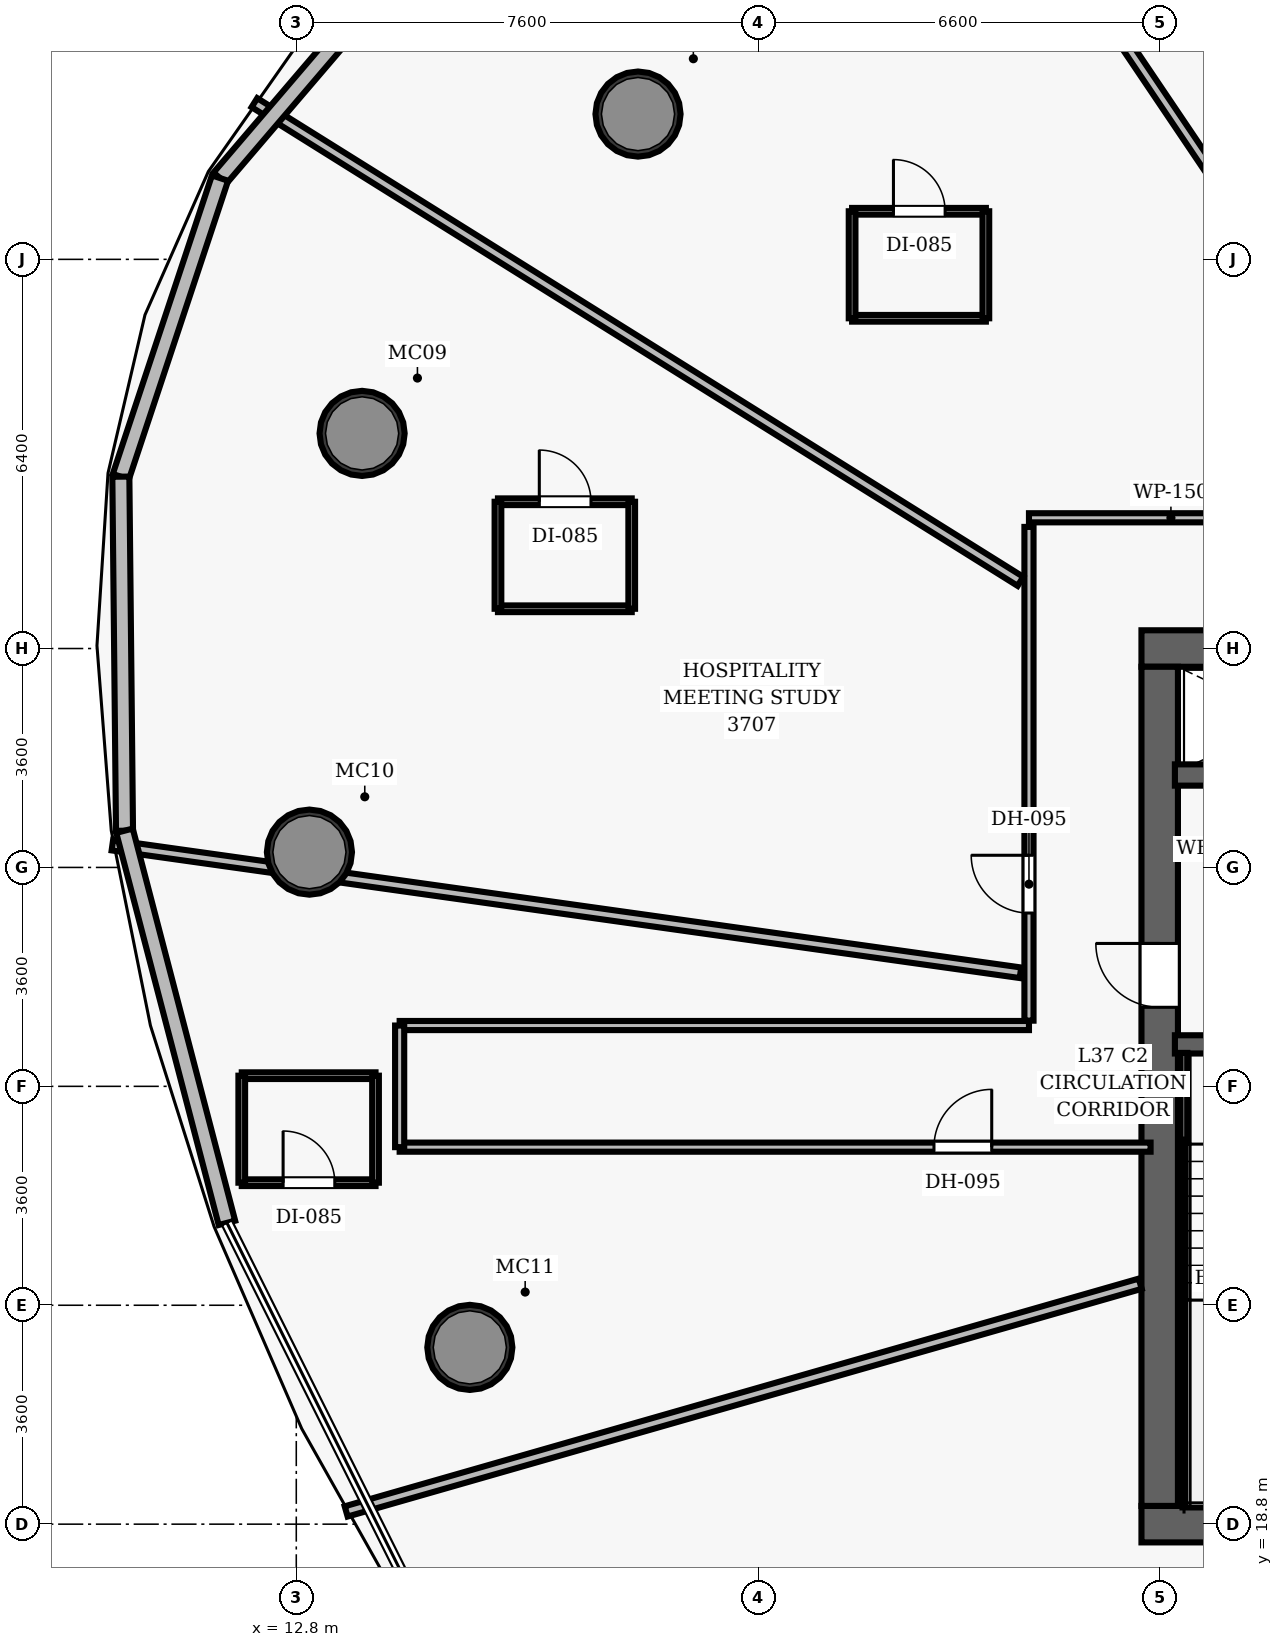
"""IFC4 building model, lengths in metres.
Left out: names, types, materials, properties, quantities, classifications, styles, units other than length and angle.
Written with IfcOpenShell. Run it as: python <this file> out.ifc"""

import sys

from ifc_helpers import new_model, si_unit, direction, frame, frame_2d, origin, origin_2d, place, context, subcontext, project, spatial, rectangle, hollow_circle, extrude, element, fill, save


model = new_model("IFC4")
c1 = context("Model", 3, precision=1e-05, world=origin(), true_north=direction((0.0, 1.0)))
c2 = subcontext(c1, "Body", "Model", "MODEL_VIEW")
j1 = project(units=[si_unit("LENGTHUNIT", "METRE"), si_unit("PLANEANGLEUNIT", "RADIAN")], contexts=[c1])
p1 = place(None, origin())
s1 = spatial("IfcSite", under=j1, at=p1, CompositionType="ELEMENT")
p2 = place(p1, origin())
s2 = spatial("IfcBuilding", under=s1, at=p2, CompositionType="ELEMENT")
p3 = place(p2, frame((0.0, 0.0, 148.3)))
s3 = spatial("IfcBuildingStorey", under=s2, at=p3, CompositionType="ELEMENT", Elevation=148.3)
p4 = place(p3, frame((26.7, 18.8, 0.0), z_axis=(0.0, 0.0, 1.0), x_axis=(1.0, 0.0, 0.0)))
e1 = element("IfcWall", 1, at=p4, inside=s3, PredefinedType="SHEAR", context=c2, shape_type="SweptSolid", body=[
    extrude(rectangle(XDim=22.6, YDim=0.6, at=frame_2d((11.3, 0.0))), origin(), (0.0, 0.0, 1.0), 3.5),
])
p5 = place(p4, frame((14.52, 0.0, 0.0)))
e2 = element("IfcOpeningElement", 2, at=p5, cuts=e1, PredefinedType="OPENING", context=c2, shape_type="SweptSolid", body=[
    extrude(rectangle(XDim=1.05, YDim=2.15, at=frame_2d((0.525, 1.075))), frame((0.0, 0.31, 0.0), z_axis=(0.0, -1.0, 0.0), x_axis=(1.0, 0.0, 0.0)), (0.0, 0.0, 1.0), 0.62),
])
p6 = place(p3, frame((26.7, 33.2, 0.0), z_axis=(0.0, 0.0, 1.0), x_axis=(1.0, 0.0, 0.0)))
e3 = element("IfcWall", 3, at=p6, inside=s3, PredefinedType="SHEAR", context=c2, shape_type="SweptSolid", body=[
    extrude(rectangle(XDim=22.6, YDim=0.6, at=frame_2d((11.3, 0.0))), origin(), (0.0, 0.0, 1.0), 3.5),
])
p7 = place(p6, frame((4.62, 0.0, 0.0)))
e4 = element("IfcOpeningElement", 4, at=p7, cuts=e3, PredefinedType="OPENING", context=c2, shape_type="SweptSolid", body=[
    extrude(rectangle(XDim=1.05, YDim=2.15, at=frame_2d((0.525, 1.075))), frame((0.0, 0.31, 0.0), z_axis=(0.0, -1.0, 0.0), x_axis=(1.0, 0.0, 0.0)), (0.0, 0.0, 1.0), 0.62),
])
p8 = place(p6, frame((14.52, 0.0, 0.0)))
e5 = element("IfcOpeningElement", 5, at=p8, cuts=e3, PredefinedType="OPENING", context=c2, shape_type="SweptSolid", body=[
    extrude(rectangle(XDim=1.05, YDim=2.15, at=frame_2d((0.525, 1.075))), frame((0.0, 0.31, 0.0), z_axis=(0.0, -1.0, 0.0), x_axis=(1.0, 0.0, 0.0)), (0.0, 0.0, 1.0), 0.62),
])
p9 = place(p3, frame((27.0, 19.1, 0.0), z_axis=(0.0, 0.0, 1.0), x_axis=(0.0, 1.0, 0.0)))
e6 = element("IfcWall", 6, at=p9, inside=s3, PredefinedType="SHEAR", context=c2, shape_type="SweptSolid", body=[
    extrude(rectangle(XDim=13.8, YDim=0.6, at=frame_2d((6.9, 0.0))), origin(), (0.0, 0.0, 1.0), 3.5),
])
p10 = place(p9, frame((8.2, 0.0, 0.0)))
e7 = element("IfcOpeningElement", 7, at=p10, cuts=e6, PredefinedType="OPENING", context=c2, shape_type="SweptSolid", body=[
    extrude(rectangle(XDim=1.05, YDim=2.15, at=frame_2d((0.525, 1.075))), frame((0.0, 0.31, 0.0), z_axis=(0.0, -1.0, 0.0), x_axis=(1.0, 0.0, 0.0)), (0.0, 0.0, 1.0), 0.62),
])
for number, where, z_axis, x_axis in (
    (8, (18.42, 41.989, 0.0), (0.0, 0.0, 1.0), (1.0, 0.0, 0.0)),
    (9, (13.882, 36.738, 0.0), (0.0, 0.0, 1.0), (1.0, 0.0, 0.0)),
    (10, (13.016, 29.852, 0.0), (0.0, 0.0, 1.0), (1.0, 0.0, 0.0)),
    (11, (15.654, 21.707, 0.0), (0.0, 0.0, 1.0), (1.0, 0.0, 0.0)),
):
    element("IfcColumn", number, at=place(p3, frame(where, z_axis=z_axis, x_axis=x_axis)), inside=s3, PredefinedType="COLUMN", context=c2, shape_type="SweptSolid", body=[
        extrude(hollow_circle(Radius=0.7, WallThickness=0.055, at=origin_2d()), origin(), (0.0, 0.0, 1.0), 3.5),
    ])
p11 = place(p3, frame((27.25, 26.69, 0.0), z_axis=(0.0, 0.0, 1.0), x_axis=(1.0, 0.0, 0.0)))
e12 = element("IfcWall", 12, at=p11, inside=s3, PredefinedType="SHEAR", context=c2, shape_type="SweptSolid", body=[
    extrude(rectangle(XDim=3.67, YDim=0.3, at=frame_2d((1.835, 0.0))), origin(), (0.0, 0.0, 1.0), 3.5),
])
p12 = place(p11, frame((1.05, 0.0, 0.0)))
e13 = element("IfcOpeningElement", 13, at=p12, cuts=e12, PredefinedType="OPENING", context=c2, shape_type="SweptSolid", body=[
    extrude(rectangle(XDim=1.1, YDim=2.15, at=frame_2d((0.55, 1.075))), frame((0.0, 0.16, 0.0), z_axis=(0.0, -1.0, 0.0), x_axis=(1.0, 0.0, 0.0)), (0.0, 0.0, 1.0), 0.32),
])
p13 = place(p3, frame((27.395, 19.1, 0.0), z_axis=(0.0, 0.0, 1.0), x_axis=(0.0, 1.0, 0.0)))
e14 = element("IfcWall", 14, at=p13, inside=s3, PredefinedType="SHEAR", context=c2, shape_type="SweptSolid", body=[
    extrude(rectangle(XDim=7.45, YDim=0.12, at=frame_2d((3.725, 0.0))), origin(), (0.0, 0.0, 1.0), 3.5),
])
p14 = place(p3, frame((27.395, 19.16, 0.0), z_axis=(0.0, 0.0, 1.0), x_axis=(1.0, 0.0, 0.0)))
e15 = element("IfcWall", 15, at=p14, inside=s3, PredefinedType="SHEAR", context=c2, shape_type="SweptSolid", body=[
    extrude(rectangle(XDim=3.095, YDim=0.12, at=frame_2d((1.547, 0.0))), origin(), (0.0, 0.0, 1.0), 3.5),
])
p15 = place(p3, frame((27.25, 31.12, 0.0), z_axis=(0.0, 0.0, 1.0), x_axis=(1.0, 0.0, 0.0)))
e16 = element("IfcWall", 16, at=p15, inside=s3, PredefinedType="SHEAR", context=c2, shape_type="SweptSolid", body=[
    extrude(rectangle(XDim=3.67, YDim=0.35, at=frame_2d((1.835, 0.0))), origin(), (0.0, 0.0, 1.0), 2.675),
])
p16 = place(p15, frame((1.25, 0.0, 0.0)))
e17 = element("IfcOpeningElement", 17, at=p16, cuts=e16, PredefinedType="OPENING", context=c2, shape_type="SweptSolid", body=[
    extrude(rectangle(XDim=1.1, YDim=2.15, at=frame_2d((0.55, 1.075))), frame((0.0, 0.185, 0.0), z_axis=(0.0, -1.0, 0.0), x_axis=(1.0, 0.0, 0.0)), (0.0, 0.0, 1.0), 0.37),
])
p17 = place(p3, frame((24.85, 35.35, 0.0), z_axis=(0.0, 0.0, 1.0), x_axis=(1.0, 0.0, 0.0)))
e18 = element("IfcWall", 18, at=p17, inside=s3, PredefinedType="PARTITIONING", context=c2, shape_type="SweptSolid", body=[
    extrude(rectangle(XDim=26.0, YDim=0.15, at=frame_2d((13.0, 0.0))), origin(), (0.0, 0.0, 1.0), 2.675),
])
p18 = place(p17, frame((21.789, 0.0, 0.0)))
e19 = element("IfcOpeningElement", 19, at=p18, cuts=e18, PredefinedType="OPENING", context=c2, shape_type="SweptSolid", body=[
    extrude(rectangle(XDim=0.95, YDim=2.15, at=frame_2d((0.475, 1.075))), frame((0.0, 0.085, 0.0), z_axis=(0.0, -1.0, 0.0), x_axis=(1.0, 0.0, 0.0)), (0.0, 0.0, 1.0), 0.17),
])
p19 = place(p17, frame((16.151, 0.0, 0.0)))
e20 = element("IfcOpeningElement", 20, at=p19, cuts=e18, PredefinedType="OPENING", context=c2, shape_type="SweptSolid", body=[
    extrude(rectangle(XDim=0.95, YDim=2.15, at=frame_2d((0.475, 1.075))), frame((0.0, 0.085, 0.0), z_axis=(0.0, -1.0, 0.0), x_axis=(1.0, 0.0, 0.0)), (0.0, 0.0, 1.0), 0.17),
])
p20 = place(p17, frame((12.327, 0.0, 0.0)))
e21 = element("IfcOpeningElement", 21, at=p20, cuts=e18, PredefinedType="OPENING", context=c2, shape_type="SweptSolid", body=[
    extrude(rectangle(XDim=0.95, YDim=2.15, at=frame_2d((0.475, 1.075))), frame((0.0, 0.085, 0.0), z_axis=(0.0, -1.0, 0.0), x_axis=(1.0, 0.0, 0.0)), (0.0, 0.0, 1.0), 0.17),
])
p21 = place(p17, frame((7.312, 0.0, 0.0)))
e22 = element("IfcOpeningElement", 22, at=p21, cuts=e18, PredefinedType="OPENING", context=c2, shape_type="SweptSolid", body=[
    extrude(rectangle(XDim=0.95, YDim=2.15, at=frame_2d((0.475, 1.075))), frame((0.0, 0.085, 0.0), z_axis=(0.0, -1.0, 0.0), x_axis=(1.0, 0.0, 0.0)), (0.0, 0.0, 1.0), 0.17),
])
p22 = place(p17, frame((4.819, 0.0, 0.0)))
e23 = element("IfcOpeningElement", 23, at=p22, cuts=e18, PredefinedType="OPENING", context=c2, shape_type="SweptSolid", body=[
    extrude(rectangle(XDim=0.95, YDim=2.15, at=frame_2d((0.475, 1.075))), frame((0.0, 0.085, 0.0), z_axis=(0.0, -1.0, 0.0), x_axis=(1.0, 0.0, 0.0)), (0.0, 0.0, 1.0), 0.17),
])
p23 = place(p3, frame((24.85, 27.08, 0.0), z_axis=(0.0, 0.0, 1.0), x_axis=(0.0, 1.0, 0.0)))
e24 = element("IfcWall", 24, at=p23, inside=s3, PredefinedType="PARTITIONING", context=c2, shape_type="SweptSolid", body=[
    extrude(rectangle(XDim=8.12, YDim=0.15, at=frame_2d((4.06, 0.0))), origin(), (0.0, 0.0, 1.0), 2.675),
])
p24 = place(p23, frame((1.77, 0.0, 0.0)))
e25 = element("IfcOpeningElement", 25, at=p24, cuts=e24, PredefinedType="OPENING", context=c2, shape_type="SweptSolid", body=[
    extrude(rectangle(XDim=0.95, YDim=2.15, at=frame_2d((0.475, 1.075))), frame((0.0, 0.085, 0.0), z_axis=(0.0, -1.0, 0.0), x_axis=(1.0, 0.0, 0.0)), (0.0, 0.0, 1.0), 0.17),
])
p25 = place(p3, frame((14.5, 27.0, 0.0), z_axis=(0.0, 0.0, 1.0), x_axis=(1.0, 0.0, 0.0)))
e26 = element("IfcWall", 26, at=p25, inside=s3, PredefinedType="PARTITIONING", context=c2, shape_type="SweptSolid", body=[
    extrude(rectangle(XDim=10.35, YDim=0.15, at=frame_2d((5.175, 0.0))), origin(), (0.0, 0.0, 1.0), 2.675),
])
p26 = place(p3, frame((14.5, 25.0, 0.0), z_axis=(0.0, 0.0, 1.0), x_axis=(1.0, 0.0, 0.0)))
e27 = element("IfcWall", 27, at=p26, inside=s3, PredefinedType="PARTITIONING", context=c2, shape_type="SweptSolid", body=[
    extrude(rectangle(XDim=12.35, YDim=0.15, at=frame_2d((6.175, 0.0))), origin(), (0.0, 0.0, 1.0), 2.675),
])
p27 = place(p26, frame((8.788, 0.0, 0.0)))
e28 = element("IfcOpeningElement", 28, at=p27, cuts=e27, PredefinedType="OPENING", context=c2, shape_type="SweptSolid", body=[
    extrude(rectangle(XDim=0.95, YDim=2.15, at=frame_2d((0.475, 1.075))), frame((0.0, 0.085, 0.0), z_axis=(0.0, -1.0, 0.0), x_axis=(1.0, 0.0, 0.0)), (0.0, 0.0, 1.0), 0.17),
])
p28 = place(p3, frame((14.5, 25.0, 0.0), z_axis=(0.0, 0.0, 1.0), x_axis=(0.0, 1.0, 0.0)))
e29 = element("IfcWall", 29, at=p28, inside=s3, PredefinedType="PARTITIONING", context=c2, shape_type="SweptSolid", body=[
    extrude(rectangle(XDim=2.0, YDim=0.15, at=frame_2d((1.0, 0.0))), origin(), (0.0, 0.0, 1.0), 2.675),
])
p29 = place(p3, frame((31.599, 35.49, 0.0), z_axis=(0.0, 0.0, 1.0), x_axis=(-0.55918931687, 0.829039991736, 0.0)))
e30 = element("IfcWall", 30, at=p29, inside=s3, PredefinedType="PARTITIONING", context=c2, shape_type="SweptSolid", body=[
    extrude(rectangle(XDim=16.299, YDim=0.175, at=frame_2d((8.149, 0.0))), origin(), (0.0, 0.0, 1.0), 2.675),
])
p30 = place(p3, frame((24.71, 34.304, 0.0), z_axis=(0.0, 0.0, 1.0), x_axis=(-0.848041694206, 0.529929509357, 0.0)))
e31 = element("IfcWall", 31, at=p30, inside=s3, PredefinedType="PARTITIONING", context=c2, shape_type="SweptSolid", body=[
    extrude(rectangle(XDim=14.856, YDim=0.175, at=frame_2d((7.428, 0.0))), origin(), (0.0, 0.0, 1.0), 2.675),
])
p31 = place(p3, frame((24.71, 27.868, 0.0), z_axis=(0.0, 0.0, 1.0), x_axis=(-0.990268434497, 0.139170498453, 0.0)))
e32 = element("IfcWall", 32, at=p31, inside=s3, PredefinedType="PARTITIONING", context=c2, shape_type="SweptSolid", body=[
    extrude(rectangle(XDim=15.081, YDim=0.175, at=frame_2d((7.541, 0.0))), origin(), (0.0, 0.0, 1.0), 2.675),
])
p32 = place(p3, frame((26.68, 22.754, 0.0), z_axis=(0.0, 0.0, 1.0), x_axis=(-0.96126584255, -0.275622894454, 0.0)))
e33 = element("IfcWall", 33, at=p32, inside=s3, PredefinedType="PARTITIONING", context=c2, shape_type="SweptSolid", body=[
    extrude(rectangle(XDim=13.586, YDim=0.175, at=frame_2d((6.793, 0.0))), origin(), (0.0, 0.0, 1.0), 2.675),
])
p33 = place(p3, frame((29.038, 18.48, 0.0), z_axis=(0.0, 0.0, 1.0), x_axis=(-0.766047971117, -0.642783405159, 0.0)))
e34 = element("IfcWall", 34, at=p33, inside=s3, PredefinedType="PARTITIONING", context=c2, shape_type="SweptSolid", body=[
    extrude(rectangle(XDim=11.939, YDim=0.175, at=frame_2d((5.97, 0.0))), origin(), (0.0, 0.0, 1.0), 2.675),
])
p34 = place(p3, frame((21.941, 38.631, 0.0), z_axis=(0.0, 0.0, 1.0), x_axis=(1.0, 0.0, 0.0)))
e35 = element("IfcWall", 35, at=p34, inside=s3, PredefinedType="PARTITIONING", context=c2, shape_type="SweptSolid", body=[
    extrude(rectangle(XDim=2.2, YDim=0.11, at=frame_2d((1.1, 0.0))), origin(), (0.0, 0.0, 1.0), 2.675),
])
p35 = place(p3, frame((21.941, 40.391, 0.0), z_axis=(0.0, 0.0, 1.0), x_axis=(1.0, 0.0, 0.0)))
e36 = element("IfcWall", 36, at=p35, inside=s3, PredefinedType="PARTITIONING", context=c2, shape_type="SweptSolid", body=[
    extrude(rectangle(XDim=2.2, YDim=0.11, at=frame_2d((1.1, 0.0))), origin(), (0.0, 0.0, 1.0), 2.675),
])
p36 = place(p35, frame((0.68, 0.0, 0.0)))
e37 = element("IfcOpeningElement", 37, at=p36, cuts=e36, PredefinedType="OPENING", context=c2, shape_type="SweptSolid", body=[
    extrude(rectangle(XDim=0.85, YDim=2.1, at=frame_2d((0.425, 1.05))), frame((0.0, 0.065, 0.0), z_axis=(0.0, -1.0, 0.0), x_axis=(1.0, 0.0, 0.0)), (0.0, 0.0, 1.0), 0.13),
])
for number, where, z_axis, x_axis in (
    (38, (21.941, 38.631, 0.0), (0.0, 0.0, 1.0), (0.0, 1.0, 0.0)),
    (39, (24.141, 38.631, 0.0), (0.0, 0.0, 1.0), (0.0, 1.0, 0.0)),
):
    element("IfcWall", number, at=place(p3, frame(where, z_axis=z_axis, x_axis=x_axis)), inside=s3, PredefinedType="PARTITIONING", context=c2, shape_type="SweptSolid", body=[
        extrude(rectangle(XDim=1.76, YDim=0.11, at=frame_2d((0.88, 0.0))), origin(), (0.0, 0.0, 1.0), 2.675),
    ])
p37 = place(p3, frame((16.117, 33.854, 0.0), z_axis=(0.0, 0.0, 1.0), x_axis=(1.0, 0.0, 0.0)))
e40 = element("IfcWall", 40, at=p37, inside=s3, PredefinedType="PARTITIONING", context=c2, shape_type="SweptSolid", body=[
    extrude(rectangle(XDim=2.2, YDim=0.11, at=frame_2d((1.1, 0.0))), origin(), (0.0, 0.0, 1.0), 2.675),
])
p38 = place(p3, frame((16.117, 35.614, 0.0), z_axis=(0.0, 0.0, 1.0), x_axis=(1.0, 0.0, 0.0)))
e41 = element("IfcWall", 41, at=p38, inside=s3, PredefinedType="PARTITIONING", context=c2, shape_type="SweptSolid", body=[
    extrude(rectangle(XDim=2.2, YDim=0.11, at=frame_2d((1.1, 0.0))), origin(), (0.0, 0.0, 1.0), 2.675),
])
p39 = place(p38, frame((0.68, 0.0, 0.0)))
e42 = element("IfcOpeningElement", 42, at=p39, cuts=e41, PredefinedType="OPENING", context=c2, shape_type="SweptSolid", body=[
    extrude(rectangle(XDim=0.85, YDim=2.1, at=frame_2d((0.425, 1.05))), frame((0.0, 0.065, 0.0), z_axis=(0.0, -1.0, 0.0), x_axis=(1.0, 0.0, 0.0)), (0.0, 0.0, 1.0), 0.13),
])
for number, where, z_axis, x_axis in (
    (43, (16.117, 33.854, 0.0), (0.0, 0.0, 1.0), (0.0, 1.0, 0.0)),
    (44, (18.317, 33.854, 0.0), (0.0, 0.0, 1.0), (0.0, 1.0, 0.0)),
):
    element("IfcWall", number, at=place(p3, frame(where, z_axis=z_axis, x_axis=x_axis)), inside=s3, PredefinedType="PARTITIONING", context=c2, shape_type="SweptSolid", body=[
        extrude(rectangle(XDim=1.76, YDim=0.11, at=frame_2d((0.88, 0.0))), origin(), (0.0, 0.0, 1.0), 2.675),
    ])
p40 = place(p3, frame((11.903, 24.415, 0.0), z_axis=(0.0, 0.0, 1.0), x_axis=(1.0, 0.0, 0.0)))
e45 = element("IfcWall", 45, at=p40, inside=s3, PredefinedType="PARTITIONING", context=c2, shape_type="SweptSolid", body=[
    extrude(rectangle(XDim=2.2, YDim=0.11, at=frame_2d((1.1, 0.0))), origin(), (0.0, 0.0, 1.0), 2.675),
])
p41 = place(p40, frame((0.68, 0.0, 0.0)))
e46 = element("IfcOpeningElement", 46, at=p41, cuts=e45, PredefinedType="OPENING", context=c2, shape_type="SweptSolid", body=[
    extrude(rectangle(XDim=0.85, YDim=2.1, at=frame_2d((0.425, 1.05))), frame((0.0, 0.065, 0.0), z_axis=(0.0, -1.0, 0.0), x_axis=(1.0, 0.0, 0.0)), (0.0, 0.0, 1.0), 0.13),
])
p42 = place(p3, frame((11.903, 26.175, 0.0), z_axis=(0.0, 0.0, 1.0), x_axis=(1.0, 0.0, 0.0)))
e47 = element("IfcWall", 47, at=p42, inside=s3, PredefinedType="PARTITIONING", context=c2, shape_type="SweptSolid", body=[
    extrude(rectangle(XDim=2.2, YDim=0.11, at=frame_2d((1.1, 0.0))), origin(), (0.0, 0.0, 1.0), 2.675),
])
for number, where, z_axis, x_axis in (
    (48, (11.903, 24.415, 0.0), (0.0, 0.0, 1.0), (0.0, 1.0, 0.0)),
    (49, (14.103, 24.415, 0.0), (0.0, 0.0, 1.0), (0.0, 1.0, 0.0)),
):
    element("IfcWall", number, at=place(p3, frame(where, z_axis=z_axis, x_axis=x_axis)), inside=s3, PredefinedType="PARTITIONING", context=c2, shape_type="SweptSolid", body=[
        extrude(rectangle(XDim=1.76, YDim=0.11, at=frame_2d((0.88, 0.0))), origin(), (0.0, 0.0, 1.0), 2.675),
    ])
for number, where, z_axis, x_axis in (
    (50, (11.545, 40.937, 0.0), (0.0, 0.0, 1.0), (0.65, 0.76, 0.0)),
    (51, (9.915, 36.026, 0.0), (0.0, 0.0, 1.0), (0.315, 0.949, 0.0)),
):
    element("IfcWall", number, at=place(p3, frame(where, z_axis=z_axis, x_axis=x_axis)), inside=s3, PredefinedType="SOLIDWALL", context=c2, shape_type="SweptSolid", body=[
        extrude(rectangle(XDim=5.174, YDim=0.28, at=frame_2d((2.587, 0.0))), origin(), (0.0, 0.0, 1.0), 3.26),
    ])
p43 = place(p3, frame((9.975, 30.204, 0.0), z_axis=(0.0, 0.0, 1.0), x_axis=(-0.010314349205, 0.999946805685, 0.0)))
e52 = element("IfcWall", 52, at=p43, inside=s3, PredefinedType="SOLIDWALL", context=c2, shape_type="SweptSolid", body=[
    extrude(rectangle(XDim=5.823, YDim=0.28, at=frame_2d((2.911, 0.0))), origin(), (0.0, 0.0, 1.0), 3.26),
])
p44 = place(p3, frame((11.659, 23.755, 0.0), z_axis=(0.0, 0.0, 1.0), x_axis=(-0.252709673809, 0.967542154515, 0.0)))
e53 = element("IfcWall", 53, at=p44, inside=s3, PredefinedType="SOLIDWALL", context=c2, shape_type="SweptSolid", body=[
    extrude(rectangle(XDim=6.665, YDim=0.28, at=frame_2d((3.333, 0.0))), origin(), (0.0, 0.0, 1.0), 3.26),
])
p45 = place(p10, origin())
e54 = element("IfcDoor", 54, at=p45, inside=s3, OperationType="SINGLE_SWING_RIGHT", PredefinedType="DOOR", context=c2, shape_type="SweptSolid", body=[
    extrude(rectangle(XDim=1.05, YDim=2.15, at=frame_2d((0.525, 1.075))), frame((0.0, 0.025, 0.0), z_axis=(0.0, -1.0, 0.0), x_axis=(1.0, 0.0, 0.0)), (0.0, 0.0, 1.0), 0.05),
])
fill(e7, e54)
p46 = place(p36, origin())
e55 = element("IfcDoor", 55, at=p46, inside=s3, OperationType="SINGLE_SWING_LEFT", PredefinedType="DOOR", context=c2, shape_type="SweptSolid", body=[
    extrude(rectangle(XDim=0.85, YDim=2.1, at=frame_2d((0.425, 1.05))), frame((0.0, 0.025, 0.0), z_axis=(0.0, -1.0, 0.0), x_axis=(1.0, 0.0, 0.0)), (0.0, 0.0, 1.0), 0.05),
])
fill(e37, e55)
p47 = place(p24, origin())
e56 = element("IfcDoor", 56, at=p47, inside=s3, OperationType="SINGLE_SWING_RIGHT", PredefinedType="DOOR", context=c2, shape_type="SweptSolid", body=[
    extrude(rectangle(XDim=0.95, YDim=2.15, at=frame_2d((0.475, 1.075))), frame((0.0, 0.025, 0.0), z_axis=(0.0, -1.0, 0.0), x_axis=(1.0, 0.0, 0.0)), (0.0, 0.0, 1.0), 0.05),
])
fill(e25, e56)
p48 = place(p39, origin())
e57 = element("IfcDoor", 57, at=p48, inside=s3, OperationType="SINGLE_SWING_LEFT", PredefinedType="DOOR", context=c2, shape_type="SweptSolid", body=[
    extrude(rectangle(XDim=0.85, YDim=2.1, at=frame_2d((0.425, 1.05))), frame((0.0, 0.025, 0.0), z_axis=(0.0, -1.0, 0.0), x_axis=(1.0, 0.0, 0.0)), (0.0, 0.0, 1.0), 0.05),
])
fill(e42, e57)
p49 = place(p27, origin())
e58 = element("IfcDoor", 58, at=p49, inside=s3, OperationType="SINGLE_SWING_RIGHT", PredefinedType="DOOR", context=c2, shape_type="SweptSolid", body=[
    extrude(rectangle(XDim=0.95, YDim=2.15, at=frame_2d((0.475, 1.075))), frame((0.0, 0.025, 0.0), z_axis=(0.0, -1.0, 0.0), x_axis=(1.0, 0.0, 0.0)), (0.0, 0.0, 1.0), 0.05),
])
fill(e28, e58)
p50 = place(p41, origin())
e59 = element("IfcDoor", 59, at=p50, inside=s3, OperationType="SINGLE_SWING_LEFT", PredefinedType="DOOR", context=c2, shape_type="SweptSolid", body=[
    extrude(rectangle(XDim=0.85, YDim=2.1, at=frame_2d((0.425, 1.05))), frame((0.0, 0.025, 0.0), z_axis=(0.0, -1.0, 0.0), x_axis=(1.0, 0.0, 0.0)), (0.0, 0.0, 1.0), 0.05),
])
fill(e46, e59)
save(model, sys.argv[1])
